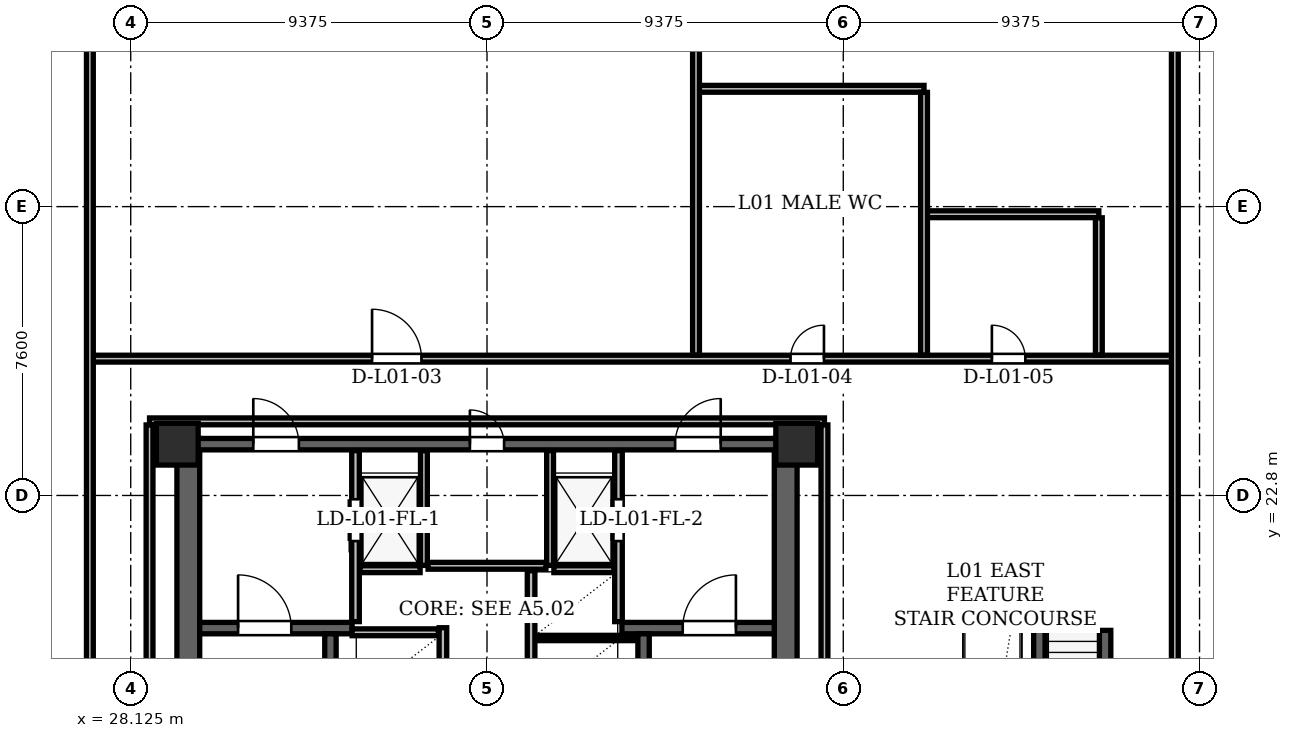
"""IFC4 building model, lengths in metres.
Left out: names, types, materials, properties, quantities, classifications, styles, units other than length and angle.
Written with IfcOpenShell. Run it as: python <this file> out.ifc"""

import sys

from ifc_helpers import new_model, si_unit, direction, frame, frame_2d, origin, origin_2d, place, context, subcontext, project, spatial, rectangle, hollow_rectangle, extrude, element, fill, save


model = new_model("IFC4")
c1 = context("Model", 3, precision=1e-05, world=origin(), true_north=direction((0.0, 1.0)))
c2 = subcontext(c1, "Body", "Model", "MODEL_VIEW")
j1 = project(units=[si_unit("LENGTHUNIT", "METRE"), si_unit("PLANEANGLEUNIT", "RADIAN")], contexts=[c1])
p1 = place(None, origin())
s1 = spatial("IfcSite", under=j1, at=p1, CompositionType="ELEMENT")
p2 = place(p1, origin())
s2 = spatial("IfcBuilding", under=s1, at=p2, CompositionType="ELEMENT")
p3 = place(p2, frame((0.0, 0.0, 5.4)))
s3 = spatial("IfcBuildingStorey", under=s2, at=p3, CompositionType="ELEMENT", Elevation=5.4)
for number, where, z_axis, x_axis in (
    (1, (45.65, 24.15, 0.0), (0.0, 0.0, 1.0), (1.0, 0.0, 0.0)),
    (2, (29.35, 24.15, 0.0), (0.0, 0.0, 1.0), (1.0, 0.0, 0.0)),
):
    element("IfcColumn", number, at=place(p3, frame(where, z_axis=z_axis, x_axis=x_axis)), inside=s3, PredefinedType="COLUMN", context=c2, shape_type="SweptSolid", body=[
        extrude(hollow_rectangle(XDim=1.1, YDim=1.1, WallThickness=0.09, at=origin_2d()), origin(), (0.0, 0.0, 1.0), 4.5),
    ])
for number, where, z_axis, x_axis in (
    (3, (29.64, 11.0, 0.0), (0.0, 0.0, 1.0), (0.0, 1.0, 0.0)),
    (4, (45.36, 11.0, 0.0), (0.0, 0.0, 1.0), (0.0, 1.0, 0.0)),
):
    element("IfcWall", number, at=place(p3, frame(where, z_axis=z_axis, x_axis=x_axis)), inside=s3, PredefinedType="SHEAR", context=c2, shape_type="SweptSolid", body=[
        extrude(rectangle(XDim=13.3, YDim=0.6, at=frame_2d((6.65, 0.0))), origin(), (0.0, 0.0, 1.0), 4.22),
    ])
p4 = place(p3, frame((29.65, 24.15, 0.0), z_axis=(0.0, 0.0, 1.0), x_axis=(1.0, 0.0, 0.0)))
e5 = element("IfcWall", 5, at=p4, inside=s3, PredefinedType="SHEAR", context=c2, shape_type="SweptSolid", body=[
    extrude(rectangle(XDim=15.7, YDim=0.3, at=frame_2d((7.85, 0.0))), origin(), (0.0, 0.0, 1.0), 4.22),
])
p5 = place(p4, frame((1.7, 0.0, 0.0)))
e6 = element("IfcOpeningElement", 6, at=p5, cuts=e5, PredefinedType="OPENING", context=c2, shape_type="SweptSolid", body=[
    extrude(rectangle(XDim=1.2, YDim=2.2, at=frame_2d((0.6, 1.1))), frame((0.0, 0.15, 0.0), z_axis=(0.0, -1.0, 0.0), x_axis=(1.0, 0.0, 0.0)), (0.0, 0.0, 1.0), 0.3),
])
p6 = place(p4, frame((12.8, 0.0, 0.0)))
e7 = element("IfcOpeningElement", 7, at=p6, cuts=e5, PredefinedType="OPENING", context=c2, shape_type="SweptSolid", body=[
    extrude(rectangle(XDim=1.2, YDim=2.2, at=frame_2d((0.6, 1.1))), frame((0.0, 0.15, 0.0), z_axis=(0.0, -1.0, 0.0), x_axis=(1.0, 0.0, 0.0)), (0.0, 0.0, 1.0), 0.3),
])
p7 = place(p4, frame((7.4, 0.0, 0.0)))
e8 = element("IfcOpeningElement", 8, at=p7, cuts=e5, PredefinedType="OPENING", context=c2, shape_type="SweptSolid", body=[
    extrude(rectangle(XDim=0.9, YDim=2.05, at=frame_2d((0.45, 1.025))), frame((0.0, 0.15, 0.0), z_axis=(0.0, -1.0, 0.0), x_axis=(1.0, 0.0, 0.0)), (0.0, 0.0, 1.0), 0.3),
])
p8 = place(p3, frame((29.94, 19.31, 0.0), z_axis=(0.0, 0.0, 1.0), x_axis=(1.0, 0.0, 0.0)))
e9 = element("IfcWall", 9, at=p8, inside=s3, PredefinedType="SHEAR", context=c2, shape_type="SweptSolid", body=[
    extrude(rectangle(XDim=4.01, YDim=0.3, at=frame_2d((2.005, 0.0))), origin(), (0.0, 0.0, 1.0), 4.22),
])
p9 = place(p8, frame((1.01, 0.0, 0.0)))
e10 = element("IfcOpeningElement", 10, at=p9, cuts=e9, PredefinedType="OPENING", context=c2, shape_type="SweptSolid", body=[
    extrude(rectangle(XDim=1.4, YDim=2.2, at=frame_2d((0.7, 1.1))), frame((0.0, 0.15, 0.0), z_axis=(0.0, -1.0, 0.0), x_axis=(1.0, 0.0, 0.0)), (0.0, 0.0, 1.0), 0.3),
])
p10 = place(p3, frame((41.05, 19.31, 0.0), z_axis=(0.0, 0.0, 1.0), x_axis=(1.0, 0.0, 0.0)))
e11 = element("IfcWall", 11, at=p10, inside=s3, PredefinedType="SHEAR", context=c2, shape_type="SweptSolid", body=[
    extrude(rectangle(XDim=4.01, YDim=0.3, at=frame_2d((2.005, 0.0))), origin(), (0.0, 0.0, 1.0), 4.22),
])
p11 = place(p10, frame((1.6, 0.0, 0.0)))
e12 = element("IfcOpeningElement", 12, at=p11, cuts=e11, PredefinedType="OPENING", context=c2, shape_type="SweptSolid", body=[
    extrude(rectangle(XDim=1.4, YDim=2.2, at=frame_2d((0.7, 1.1))), frame((0.0, 0.15, 0.0), z_axis=(0.0, -1.0, 0.0), x_axis=(1.0, 0.0, 0.0)), (0.0, 0.0, 1.0), 0.3),
])
for number, where, z_axis, x_axis in (
    (13, (33.38, 11.54, 0.0), (0.0, 0.0, 1.0), (0.0, 1.0, 0.0)),
    (14, (41.62, 11.54, 0.0), (0.0, 0.0, 1.0), (0.0, 1.0, 0.0)),
):
    element("IfcWall", number, at=place(p3, frame(where, z_axis=z_axis, x_axis=x_axis)), inside=s3, PredefinedType="SHEAR", context=c2, shape_type="SweptSolid", body=[
        extrude(rectangle(XDim=7.62, YDim=0.3, at=frame_2d((3.81, 0.0))), origin(), (0.0, 0.0, 1.0), 4.22),
    ])
for number, where, z_axis, x_axis in (
    (15, (52.035, 12.0, 0.0), (0.0, 0.0, 1.0), (0.0, 1.0, 0.0)),
    (16, (53.765, 12.0, 0.0), (0.0, 0.0, 1.0), (0.0, 1.0, 0.0)),
):
    element("IfcWall", number, at=place(p3, frame(where, z_axis=z_axis, x_axis=x_axis)), inside=s3, PredefinedType="SHEAR", context=c2, shape_type="SweptSolid", body=[
        extrude(rectangle(XDim=7.25, YDim=0.3, at=frame_2d((3.625, 0.0))), origin(), (0.0, 0.0, 1.0), 4.22),
    ])
p12 = place(p3, frame((34.04, 19.48, 0.0), z_axis=(0.0, 0.0, 1.0), x_axis=(0.0, 1.0, 0.0)))
e17 = element("IfcWall", 17, at=p12, inside=s3, PredefinedType="PARTITIONING", context=c2, shape_type="SweptSolid", body=[
    extrude(rectangle(XDim=4.5, YDim=0.2, at=frame_2d((2.25, 0.0))), origin(), (0.0, 0.0, 1.0), 3.26),
])
p13 = place(p12, frame((2.12, 0.0, 0.0)))
e18 = element("IfcOpeningElement", 18, at=p13, cuts=e17, PredefinedType="OPENING", context=c2, shape_type="SweptSolid", body=[
    extrude(rectangle(XDim=1.1, YDim=2.2, at=frame_2d((0.55, 1.1))), frame((0.0, 0.1, 0.0), z_axis=(0.0, -1.0, 0.0), x_axis=(1.0, 0.0, 0.0)), (0.0, 0.0, 1.0), 0.2),
])
p14 = place(p3, frame((35.84, 20.96, 0.0), z_axis=(0.0, 0.0, 1.0), x_axis=(0.0, 1.0, 0.0)))
e19 = element("IfcWall", 19, at=p14, inside=s3, PredefinedType="PARTITIONING", context=c2, shape_type="SweptSolid", body=[
    extrude(rectangle(XDim=3.02, YDim=0.18, at=frame_2d((1.51, 0.0))), origin(), (0.0, 0.0, 1.0), 3.26),
])
p15 = place(p3, frame((34.16, 20.86, 0.0), z_axis=(0.0, 0.0, 1.0), x_axis=(1.0, 0.0, 0.0)))
e20 = element("IfcWall", 20, at=p15, inside=s3, PredefinedType="PARTITIONING", context=c2, shape_type="SweptSolid", body=[
    extrude(rectangle(XDim=1.58, YDim=0.18, at=frame_2d((0.79, 0.0))), origin(), (0.0, 0.0, 1.0), 4.22),
])
p16 = place(p3, frame((40.96, 19.48, 0.0), z_axis=(0.0, 0.0, 1.0), x_axis=(0.0, 1.0, 0.0)))
e21 = element("IfcWall", 21, at=p16, inside=s3, PredefinedType="PARTITIONING", context=c2, shape_type="SweptSolid", body=[
    extrude(rectangle(XDim=4.5, YDim=0.2, at=frame_2d((2.25, 0.0))), origin(), (0.0, 0.0, 1.0), 3.26),
])
p17 = place(p16, frame((2.12, 0.0, 0.0)))
e22 = element("IfcOpeningElement", 22, at=p17, cuts=e21, PredefinedType="OPENING", context=c2, shape_type="SweptSolid", body=[
    extrude(rectangle(XDim=1.1, YDim=2.2, at=frame_2d((0.55, 1.1))), frame((0.0, 0.1, 0.0), z_axis=(0.0, -1.0, 0.0), x_axis=(1.0, 0.0, 0.0)), (0.0, 0.0, 1.0), 0.2),
])
p18 = place(p3, frame((39.16, 20.96, 0.0), z_axis=(0.0, 0.0, 1.0), x_axis=(0.0, 1.0, 0.0)))
e23 = element("IfcWall", 23, at=p18, inside=s3, PredefinedType="PARTITIONING", context=c2, shape_type="SweptSolid", body=[
    extrude(rectangle(XDim=3.02, YDim=0.18, at=frame_2d((1.51, 0.0))), origin(), (0.0, 0.0, 1.0), 3.26),
])
p19 = place(p3, frame((39.26, 20.86, 0.0), z_axis=(0.0, 0.0, 1.0), x_axis=(1.0, 0.0, 0.0)))
e24 = element("IfcWall", 24, at=p19, inside=s3, PredefinedType="PARTITIONING", context=c2, shape_type="SweptSolid", body=[
    extrude(rectangle(XDim=1.58, YDim=0.18, at=frame_2d((0.79, 0.0))), origin(), (0.0, 0.0, 1.0), 4.22),
])
p20 = place(p3, frame((36.34, 11.72, 0.0), z_axis=(0.0, 0.0, 1.0), x_axis=(0.0, 1.0, 0.0)))
e25 = element("IfcWall", 25, at=p20, inside=s3, PredefinedType="PARTITIONING", context=c2, shape_type="SweptSolid", body=[
    extrude(rectangle(XDim=7.6, YDim=0.2, at=frame_2d((3.8, 0.0))), origin(), (0.0, 0.0, 1.0), 4.22),
])
p21 = place(p20, frame((0.255, 0.0, 0.0)))
e26 = element("IfcOpeningElement", 26, at=p21, cuts=e25, PredefinedType="OPENING", context=c2, shape_type="SweptSolid", body=[
    extrude(rectangle(XDim=1.05, YDim=2.15, at=frame_2d((0.525, 1.075))), frame((0.0, 0.1, 0.0), z_axis=(0.0, -1.0, 0.0), x_axis=(1.0, 0.0, 0.0)), (0.0, 0.0, 1.0), 0.2),
])
p22 = place(p20, frame((2.105, 0.0, 0.0)))
e27 = element("IfcOpeningElement", 27, at=p22, cuts=e25, PredefinedType="OPENING", context=c2, shape_type="SweptSolid", body=[
    extrude(rectangle(XDim=1.05, YDim=2.15, at=frame_2d((0.525, 1.075))), frame((0.0, 0.1, 0.0), z_axis=(0.0, -1.0, 0.0), x_axis=(1.0, 0.0, 0.0)), (0.0, 0.0, 1.0), 0.2),
])
p23 = place(p20, frame((3.955, 0.0, 0.0)))
e28 = element("IfcOpeningElement", 28, at=p23, cuts=e25, PredefinedType="OPENING", context=c2, shape_type="SweptSolid", body=[
    extrude(rectangle(XDim=1.05, YDim=2.15, at=frame_2d((0.525, 1.075))), frame((0.0, 0.1, 0.0), z_axis=(0.0, -1.0, 0.0), x_axis=(1.0, 0.0, 0.0)), (0.0, 0.0, 1.0), 0.2),
])
p24 = place(p3, frame((33.95, 19.2, 0.0), z_axis=(0.0, 0.0, 1.0), x_axis=(1.0, 0.0, 0.0)))
e29 = element("IfcWall", 29, at=p24, inside=s3, PredefinedType="PARTITIONING", context=c2, shape_type="SweptSolid", body=[
    extrude(rectangle(XDim=2.27, YDim=0.18, at=frame_2d((1.135, 0.0))), origin(), (0.0, 0.0, 1.0), 4.22),
])
p25 = place(p3, frame((38.66, 11.72, 0.0), z_axis=(0.0, 0.0, 1.0), x_axis=(0.0, 1.0, 0.0)))
e30 = element("IfcWall", 30, at=p25, inside=s3, PredefinedType="PARTITIONING", context=c2, shape_type="SweptSolid", body=[
    extrude(rectangle(XDim=9.1, YDim=0.2, at=frame_2d((4.55, 0.0))), origin(), (0.0, 0.0, 1.0), 4.22),
])
p26 = place(p3, frame((38.78, 19.05, 0.0), z_axis=(0.0, 0.0, 1.0), x_axis=(1.0, 0.0, 0.0)))
e31 = element("IfcWall", 31, at=p26, inside=s3, PredefinedType="PARTITIONING", context=c2, shape_type="SweptSolid", body=[
    extrude(rectangle(XDim=2.66, YDim=0.14, at=frame_2d((1.33, 0.0))), origin(), (0.0, 0.0, 1.0), 4.22),
])
p27 = place(p3, frame((35.95, 20.95, 0.0), z_axis=(0.0, 0.0, 1.0), x_axis=(1.0, 0.0, 0.0)))
e32 = element("IfcWall", 32, at=p27, inside=s3, PredefinedType="PARTITIONING", context=c2, shape_type="SweptSolid", body=[
    extrude(rectangle(XDim=3.1, YDim=0.18, at=frame_2d((1.55, 0.0))), origin(), (0.0, 0.0, 1.0), 4.22),
])
p28 = place(p3, frame((28.62, 24.75, 0.0), z_axis=(0.0, 0.0, 1.0), x_axis=(1.0, 0.0, 0.0)))
e33 = element("IfcWall", 33, at=p28, inside=s3, PredefinedType="PARTITIONING", context=c2, shape_type="SweptSolid", body=[
    extrude(rectangle(XDim=17.76, YDim=0.18, at=frame_2d((8.88, 0.0))), origin(), (0.0, 0.0, 1.0), 3.283),
])
p29 = place(p3, frame((27.05, 26.4, 0.0), z_axis=(0.0, 0.0, 1.0), x_axis=(1.0, 0.0, 0.0)))
e34 = element("IfcWall", 34, at=p29, inside=s3, PredefinedType="PARTITIONING", context=c2, shape_type="SweptSolid", body=[
    extrude(rectangle(XDim=28.55, YDim=0.18, at=frame_2d((14.275, 0.0))), origin(), (0.0, 0.0, 1.0), 3.283),
])
p30 = place(p29, frame((7.425, 0.0, 0.0)))
e35 = element("IfcOpeningElement", 35, at=p30, cuts=e34, PredefinedType="OPENING", context=c2, shape_type="SweptSolid", body=[
    extrude(rectangle(XDim=1.3, YDim=2.2, at=frame_2d((0.65, 1.1))), frame((0.0, 0.09, 0.0), z_axis=(0.0, -1.0, 0.0), x_axis=(1.0, 0.0, 0.0)), (0.0, 0.0, 1.0), 0.18),
])
p31 = place(p29, frame((18.437, 0.0, 0.0)))
e36 = element("IfcOpeningElement", 36, at=p31, cuts=e34, PredefinedType="OPENING", context=c2, shape_type="SweptSolid", body=[
    extrude(rectangle(XDim=0.88, YDim=2.08, at=frame_2d((0.44, 1.04))), frame((0.0, 0.09, 0.0), z_axis=(0.0, -1.0, 0.0), x_axis=(1.0, 0.0, 0.0)), (0.0, 0.0, 1.0), 0.18),
])
p32 = place(p29, frame((23.736, 0.0, 0.0)))
e37 = element("IfcOpeningElement", 37, at=p32, cuts=e34, PredefinedType="OPENING", context=c2, shape_type="SweptSolid", body=[
    extrude(rectangle(XDim=0.88, YDim=2.08, at=frame_2d((0.44, 1.04))), frame((0.0, 0.09, 0.0), z_axis=(0.0, -1.0, 0.0), x_axis=(1.0, 0.0, 0.0)), (0.0, 0.0, 1.0), 0.18),
])
p33 = place(p3, frame((49.0, 30.2, 0.0), z_axis=(0.0, 0.0, 1.0), x_axis=(1.0, 0.0, 0.0)))
e38 = element("IfcWall", 38, at=p33, inside=s3, PredefinedType="PARTITIONING", context=c2, shape_type="SweptSolid", body=[
    extrude(rectangle(XDim=4.6, YDim=0.18, at=frame_2d((2.3, 0.0))), origin(), (0.0, 0.0, 1.0), 3.354),
])
p34 = place(p3, frame((43.0, 33.5, 0.0), z_axis=(0.0, 0.0, 1.0), x_axis=(1.0, 0.0, 0.0)))
e39 = element("IfcWall", 39, at=p34, inside=s3, PredefinedType="PARTITIONING", context=c2, shape_type="SweptSolid", body=[
    extrude(rectangle(XDim=6.0, YDim=0.18, at=frame_2d((3.0, 0.0))), origin(), (0.0, 0.0, 1.0), 3.283),
])
p35 = place(p3, frame((27.05, 10.494, 0.0), z_axis=(0.0, 0.0, 1.0), x_axis=(0.0, 1.0, 0.0)))
e40 = element("IfcWall", 40, at=p35, inside=s3, PredefinedType="PARTITIONING", context=c2, shape_type="SweptSolid", body=[
    extrude(rectangle(XDim=28.386, YDim=0.18, at=frame_2d((14.193, 0.0))), origin(), (0.0, 0.0, 1.0), 3.283),
])
p36 = place(p35, frame((5.985, 0.0, 0.0)))
e41 = element("IfcOpeningElement", 41, at=p36, cuts=e40, PredefinedType="OPENING", context=c2, shape_type="SweptSolid", body=[
    extrude(rectangle(XDim=1.3, YDim=2.2, at=frame_2d((0.65, 1.1))), frame((0.0, 0.09, 0.0), z_axis=(0.0, -1.0, 0.0), x_axis=(1.0, 0.0, 0.0)), (0.0, 0.0, 1.0), 0.18),
])
p37 = place(p3, frame((28.62, 10.494, 0.0), z_axis=(0.0, 0.0, 1.0), x_axis=(0.0, 1.0, 0.0)))
e42 = element("IfcWall", 42, at=p37, inside=s3, PredefinedType="PARTITIONING", context=c2, shape_type="SweptSolid", body=[
    extrude(rectangle(XDim=14.162, YDim=0.18, at=frame_2d((7.081, 0.0))), origin(), (0.0, 0.0, 1.0), 3.283),
])
p38 = place(p3, frame((43.0, 26.494, 0.0), z_axis=(0.0, 0.0, 1.0), x_axis=(0.0, 1.0, 0.0)))
e43 = element("IfcWall", 43, at=p38, inside=s3, PredefinedType="PARTITIONING", context=c2, shape_type="SweptSolid", body=[
    extrude(rectangle(XDim=17.462, YDim=0.18, at=frame_2d((8.731, 0.0))), origin(), (0.0, 0.0, 1.0), 3.354),
])
p39 = place(p3, frame((46.38, 10.494, 0.0), z_axis=(0.0, 0.0, 1.0), x_axis=(0.0, 1.0, 0.0)))
e44 = element("IfcWall", 44, at=p39, inside=s3, PredefinedType="PARTITIONING", context=c2, shape_type="SweptSolid", body=[
    extrude(rectangle(XDim=14.162, YDim=0.18, at=frame_2d((7.081, 0.0))), origin(), (0.0, 0.0, 1.0), 4.22),
])
p40 = place(p3, frame((49.0, 26.494, 0.0), z_axis=(0.0, 0.0, 1.0), x_axis=(0.0, 1.0, 0.0)))
e45 = element("IfcWall", 45, at=p40, inside=s3, PredefinedType="PARTITIONING", context=c2, shape_type="SweptSolid", body=[
    extrude(rectangle(XDim=6.912, YDim=0.18, at=frame_2d((3.456, 0.0))), origin(), (0.0, 0.0, 1.0), 4.22),
])
p41 = place(p3, frame((53.6, 26.494, 0.0), z_axis=(0.0, 0.0, 1.0), x_axis=(0.0, 1.0, 0.0)))
e46 = element("IfcWall", 46, at=p41, inside=s3, PredefinedType="PARTITIONING", context=c2, shape_type="SweptSolid", body=[
    extrude(rectangle(XDim=3.612, YDim=0.18, at=frame_2d((1.806, 0.0))), origin(), (0.0, 0.0, 1.0), 3.354),
])
p42 = place(p3, frame((55.6, 1.644, 0.0), z_axis=(0.0, 0.0, 1.0), x_axis=(0.0, 1.0, 0.0)))
e47 = element("IfcWall", 47, at=p42, inside=s3, PredefinedType="PARTITIONING", context=c2, shape_type="SweptSolid", body=[
    extrude(rectangle(XDim=42.312, YDim=0.18, at=frame_2d((21.156, 0.0))), origin(), (0.0, 0.0, 1.0), 3.01),
])
p43 = place(p42, frame((14.835, 0.0, 0.0)))
e48 = element("IfcOpeningElement", 48, at=p43, cuts=e47, PredefinedType="OPENING", context=c2, shape_type="SweptSolid", body=[
    extrude(rectangle(XDim=1.3, YDim=2.2, at=frame_2d((0.65, 1.1))), frame((0.0, 0.09, 0.0), z_axis=(0.0, -1.0, 0.0), x_axis=(1.0, 0.0, 0.0)), (0.0, 0.0, 1.0), 0.18),
])
p44 = place(p13, origin())
e49 = element("IfcDoor", 49, at=p44, inside=s3, OperationType="SLIDING_TO_LEFT", PredefinedType="DOOR", context=c2, shape_type="SweptSolid", body=[
    extrude(rectangle(XDim=1.1, YDim=2.2, at=frame_2d((0.55, 1.1))), frame((0.0, 0.025, 0.0), z_axis=(0.0, -1.0, 0.0), x_axis=(1.0, 0.0, 0.0)), (0.0, 0.0, 1.0), 0.05),
])
fill(e18, e49)
p45 = place(p17, origin())
e50 = element("IfcDoor", 50, at=p45, inside=s3, OperationType="SLIDING_TO_RIGHT", PredefinedType="DOOR", context=c2, shape_type="SweptSolid", body=[
    extrude(rectangle(XDim=1.1, YDim=2.2, at=frame_2d((0.55, 1.1))), frame((0.0, 0.025, 0.0), z_axis=(0.0, -1.0, 0.0), x_axis=(1.0, 0.0, 0.0)), (0.0, 0.0, 1.0), 0.05),
])
fill(e22, e50)
p46 = place(p9, origin())
e51 = element("IfcDoor", 51, at=p46, inside=s3, OperationType="SINGLE_SWING_LEFT", PredefinedType="DOOR", context=c2, shape_type="SweptSolid", body=[
    extrude(rectangle(XDim=1.4, YDim=2.2, at=frame_2d((0.7, 1.1))), frame((0.0, 0.025, 0.0), z_axis=(0.0, -1.0, 0.0), x_axis=(1.0, 0.0, 0.0)), (0.0, 0.0, 1.0), 0.05),
])
fill(e10, e51)
p47 = place(p11, origin())
e52 = element("IfcDoor", 52, at=p47, inside=s3, OperationType="SINGLE_SWING_RIGHT", PredefinedType="DOOR", context=c2, shape_type="SweptSolid", body=[
    extrude(rectangle(XDim=1.4, YDim=2.2, at=frame_2d((0.7, 1.1))), frame((0.0, 0.025, 0.0), z_axis=(0.0, -1.0, 0.0), x_axis=(1.0, 0.0, 0.0)), (0.0, 0.0, 1.0), 0.05),
])
fill(e12, e52)
p48 = place(p5, origin())
e53 = element("IfcDoor", 53, at=p48, inside=s3, OperationType="SINGLE_SWING_LEFT", PredefinedType="DOOR", context=c2, shape_type="SweptSolid", body=[
    extrude(rectangle(XDim=1.2, YDim=2.2, at=frame_2d((0.6, 1.1))), frame((0.0, 0.025, 0.0), z_axis=(0.0, -1.0, 0.0), x_axis=(1.0, 0.0, 0.0)), (0.0, 0.0, 1.0), 0.05),
])
fill(e6, e53)
p49 = place(p6, origin())
e54 = element("IfcDoor", 54, at=p49, inside=s3, OperationType="SINGLE_SWING_RIGHT", PredefinedType="DOOR", context=c2, shape_type="SweptSolid", body=[
    extrude(rectangle(XDim=1.2, YDim=2.2, at=frame_2d((0.6, 1.1))), frame((0.0, 0.025, 0.0), z_axis=(0.0, -1.0, 0.0), x_axis=(1.0, 0.0, 0.0)), (0.0, 0.0, 1.0), 0.05),
])
fill(e7, e54)
p50 = place(p7, origin())
e55 = element("IfcDoor", 55, at=p50, inside=s3, OperationType="SINGLE_SWING_LEFT", PredefinedType="DOOR", context=c2, shape_type="SweptSolid", body=[
    extrude(rectangle(XDim=0.9, YDim=2.05, at=frame_2d((0.45, 1.025))), frame((0.0, 0.025, 0.0), z_axis=(0.0, -1.0, 0.0), x_axis=(1.0, 0.0, 0.0)), (0.0, 0.0, 1.0), 0.05),
])
fill(e8, e55)
p51 = place(p30, origin())
e56 = element("IfcDoor", 56, at=p51, inside=s3, OperationType="SINGLE_SWING_LEFT", PredefinedType="DOOR", context=c2, shape_type="SweptSolid", body=[
    extrude(rectangle(XDim=1.3, YDim=2.2, at=frame_2d((0.65, 1.1))), frame((0.0, 0.025, 0.0), z_axis=(0.0, -1.0, 0.0), x_axis=(1.0, 0.0, 0.0)), (0.0, 0.0, 1.0), 0.05),
])
fill(e35, e56)
p52 = place(p31, origin())
e57 = element("IfcDoor", 57, at=p52, inside=s3, OperationType="SINGLE_SWING_RIGHT", PredefinedType="DOOR", context=c2, shape_type="SweptSolid", body=[
    extrude(rectangle(XDim=0.88, YDim=2.08, at=frame_2d((0.44, 1.04))), frame((0.0, 0.025, 0.0), z_axis=(0.0, -1.0, 0.0), x_axis=(1.0, 0.0, 0.0)), (0.0, 0.0, 1.0), 0.05),
])
fill(e36, e57)
p53 = place(p32, origin())
e58 = element("IfcDoor", 58, at=p53, inside=s3, OperationType="SINGLE_SWING_LEFT", PredefinedType="DOOR", context=c2, shape_type="SweptSolid", body=[
    extrude(rectangle(XDim=0.88, YDim=2.08, at=frame_2d((0.44, 1.04))), frame((0.0, 0.025, 0.0), z_axis=(0.0, -1.0, 0.0), x_axis=(1.0, 0.0, 0.0)), (0.0, 0.0, 1.0), 0.05),
])
fill(e37, e58)
save(model, sys.argv[1])
